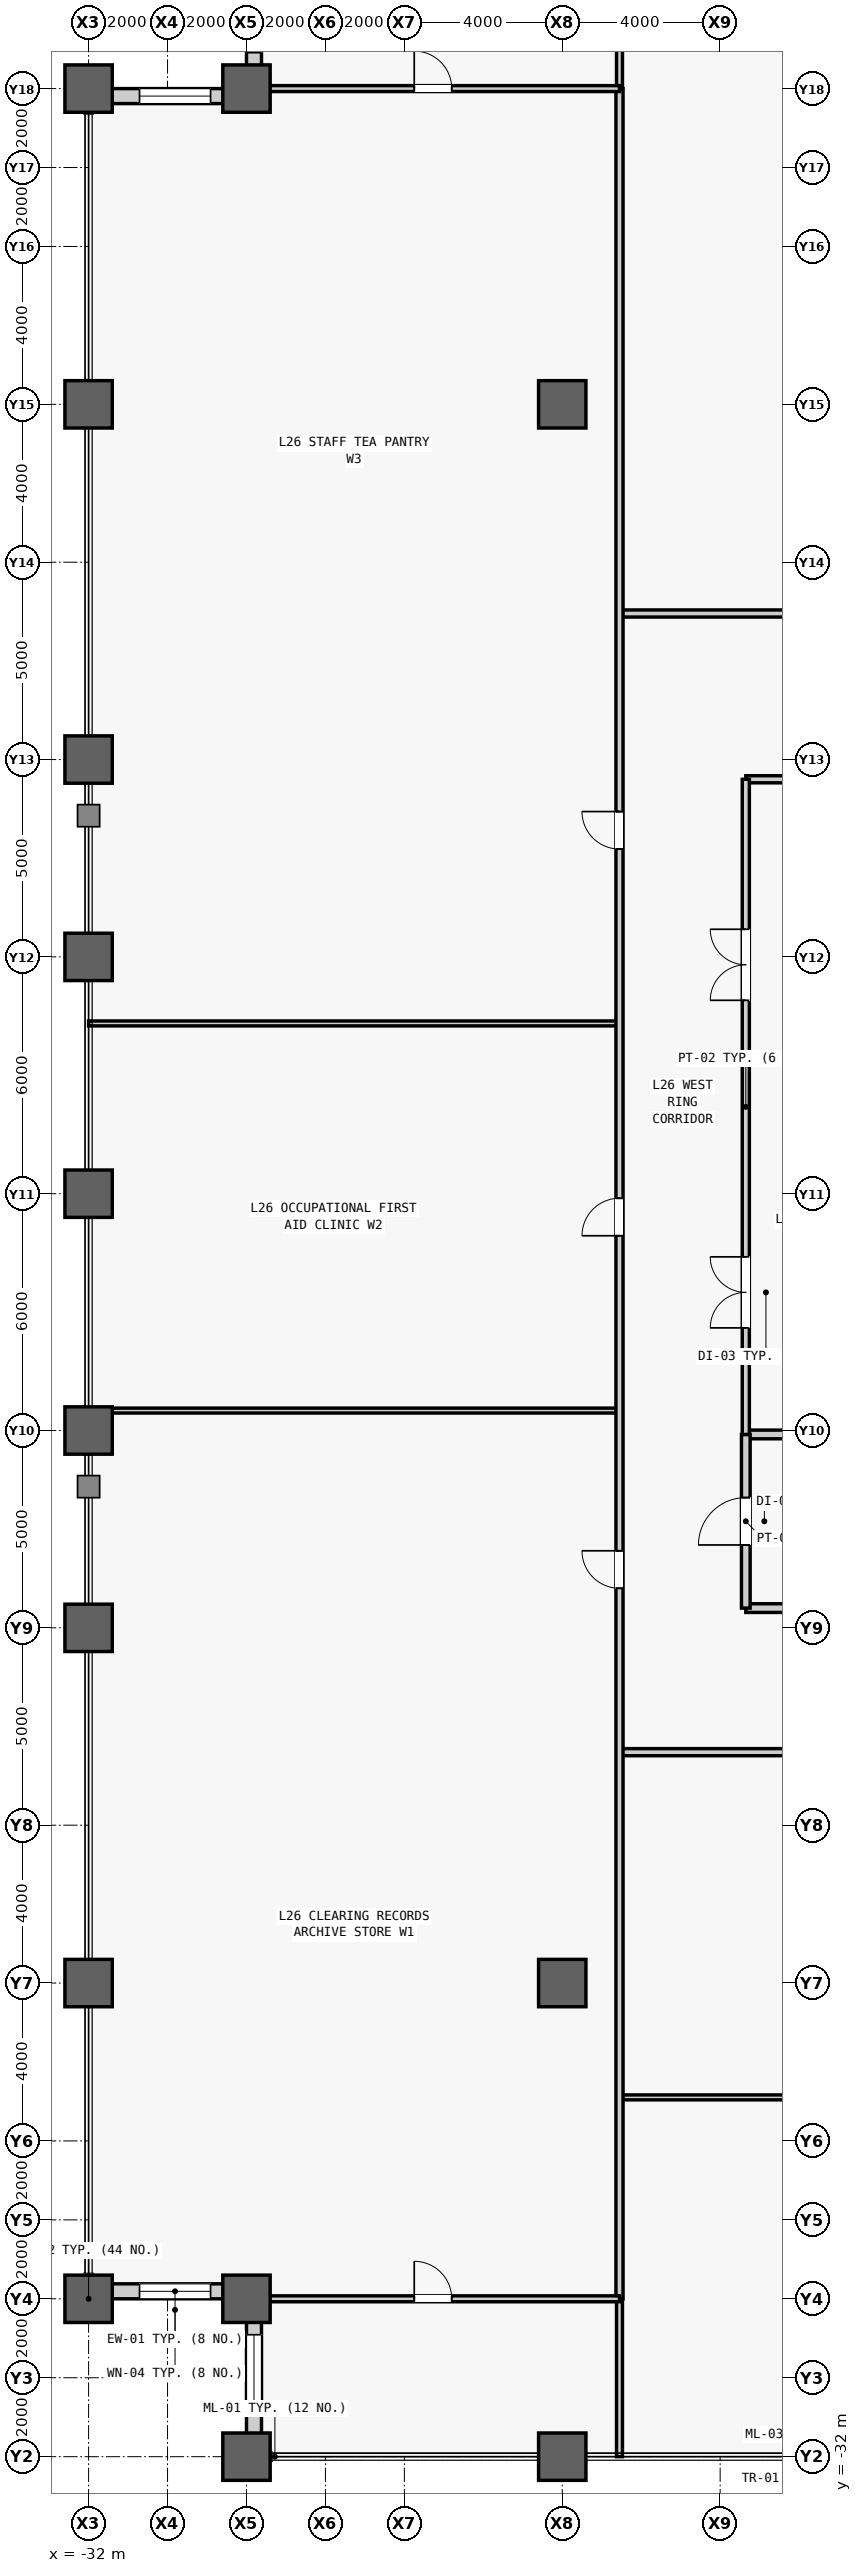
"""IFC4 building model, lengths in metres.
Left out: names, types, materials, properties, quantities, classifications, styles, units other than length and angle.
Written with IfcOpenShell. Run it as: python <this file> out.ifc"""

import sys

from ifc_helpers import new_model, si_unit, direction, frame, frame_2d, origin, origin_2d, place, context, subcontext, project, spatial, rectangle, hollow_rectangle, extrude, source, transform, mapped, element, fill, save


model = new_model("IFC4")
c1 = context("Model", 3, precision=1e-05, world=origin(), true_north=direction((0.0, 1.0)))
c2 = subcontext(c1, "Body", "Model", "MODEL_VIEW")
j1 = project(units=[si_unit("LENGTHUNIT", "METRE"), si_unit("PLANEANGLEUNIT", "RADIAN")], contexts=[c1])
p1 = place(None, origin())
s1 = spatial("IfcSite", under=j1, at=p1, CompositionType="ELEMENT")
p2 = place(p1, origin())
s2 = spatial("IfcBuilding", under=s1, at=p2, CompositionType="ELEMENT")
p3 = place(p2, frame((0.0, 0.0, 116.0)))
s3 = spatial("IfcBuildingStorey", under=s2, at=p3, CompositionType="ELEMENT", Elevation=116.0)
m1 = source(origin(), c2, "Body", "SweptSolid", [
    extrude(hollow_rectangle(XDim=1.2, YDim=1.2, WallThickness=0.07, at=origin_2d()), origin(), (0.0, 0.0, 1.0), 4.1),
])
for number, where, z_axis, x_axis in (
    (1, (-32.0, -28.0, 0.0), (0.0, 0.0, 1.0), (1.0, 0.0, 0.0)),
    (2, (-32.0, -20.0, 0.0), (0.0, 0.0, 1.0), (1.0, 0.0, 0.0)),
    (3, (-32.0, -11.0, 0.0), (0.0, 0.0, 1.0), (1.0, 0.0, 0.0)),
    (4, (-32.0, -6.0, 0.0), (0.0, 0.0, 1.0), (1.0, 0.0, 0.0)),
    (5, (-32.0, 0.0, 0.0), (0.0, 0.0, 1.0), (1.0, 0.0, 0.0)),
    (6, (-32.0, 6.0, 0.0), (0.0, 0.0, 1.0), (1.0, 0.0, 0.0)),
    (7, (-32.0, 11.0, 0.0), (0.0, 0.0, 1.0), (1.0, 0.0, 0.0)),
    (8, (-32.0, 20.0, 0.0), (0.0, 0.0, 1.0), (1.0, 0.0, 0.0)),
    (9, (-32.0, 28.0, 0.0), (0.0, 0.0, 1.0), (1.0, 0.0, 0.0)),
    (10, (-28.0, -32.0, 0.0), (0.0, 0.0, 1.0), (1.0, 0.0, 0.0)),
    (11, (-28.0, -28.0, 0.0), (0.0, 0.0, 1.0), (1.0, 0.0, 0.0)),
    (12, (-28.0, 28.0, 0.0), (0.0, 0.0, 1.0), (1.0, 0.0, 0.0)),
    (13, (-20.0, -32.0, 0.0), (0.0, 0.0, 1.0), (1.0, 0.0, 0.0)),
    (14, (-20.0, -20.0, 0.0), (0.0, 0.0, 1.0), (1.0, 0.0, 0.0)),
    (15, (-20.0, 20.0, 0.0), (0.0, 0.0, 1.0), (1.0, 0.0, 0.0)),
):
    element("IfcColumn", number, at=place(p3, frame(where, z_axis=z_axis, x_axis=x_axis)), inside=s3, PredefinedType="COLUMN", context=c2, shape_type="MappedRepresentation", body=[
        mapped(m1, transform((0.0, 0.0, 0.0), scale=1.0)),
    ])
m2 = source(origin(), c2, "Body", "SweptSolid", [
    extrude(rectangle(XDim=3.62, YDim=0.38, at=frame_2d((1.81, 0.0))), origin(), (0.0, 0.0, 1.0), 3.145),
])
p4 = place(p3, frame((-28.0, -27.81, 0.0), z_axis=(0.0, 0.0, 1.0), x_axis=(-1.0, 0.0, 0.0)))
e16 = element("IfcWall", 16, at=p4, inside=s3, PredefinedType="STANDARD", context=c2, shape_type="MappedRepresentation", body=[
    mapped(m2, transform((0.0, 0.0, 0.0), scale=1.0)),
])
m3 = source(origin(), c2, "Body", "SweptSolid", [
    extrude(rectangle(XDim=1.8, YDim=2.4, at=frame_2d((0.9, 1.2))), frame((0.0, 0.2, 0.0), z_axis=(0.0, -1.0, 0.0), x_axis=(1.0, 0.0, 0.0)), (0.0, 0.0, 1.0), 0.4),
])
p5 = place(p4, frame((0.91, 0.0, 0.5)))
e17 = element("IfcOpeningElement", 17, at=p5, cuts=e16, PredefinedType="OPENING", context=c2, shape_type="MappedRepresentation", body=[
    mapped(m3, transform((0.0, 0.0, 0.0), scale=1.0)),
])
p6 = place(p3, frame((-27.81, -31.62, 0.0), z_axis=(0.0, 0.0, 1.0), x_axis=(0.0, 1.0, 0.0)))
e18 = element("IfcWall", 18, at=p6, inside=s3, PredefinedType="STANDARD", context=c2, shape_type="MappedRepresentation", body=[
    mapped(m2, transform((0.0, 0.0, 0.0), scale=1.0)),
])
p7 = place(p6, frame((0.91, 0.0, 0.5)))
e19 = element("IfcOpeningElement", 19, at=p7, cuts=e18, PredefinedType="OPENING", context=c2, shape_type="MappedRepresentation", body=[
    mapped(m3, transform((0.0, 0.0, 0.0), scale=1.0)),
])
p8 = place(p3, frame((-27.81, 28.0, 0.0), z_axis=(0.0, 0.0, 1.0), x_axis=(0.0, 1.0, 0.0)))
e20 = element("IfcWall", 20, at=p8, inside=s3, PredefinedType="STANDARD", context=c2, shape_type="MappedRepresentation", body=[
    mapped(m2, transform((0.0, 0.0, 0.0), scale=1.0)),
])
p9 = place(p8, frame((0.91, 0.0, 0.5)))
e21 = element("IfcOpeningElement", 21, at=p9, cuts=e20, PredefinedType="OPENING", context=c2, shape_type="MappedRepresentation", body=[
    mapped(m3, transform((0.0, 0.0, 0.0), scale=1.0)),
])
p10 = place(p3, frame((-28.0, 27.81, 0.0), z_axis=(0.0, 0.0, 1.0), x_axis=(-1.0, 0.0, 0.0)))
e22 = element("IfcWall", 22, at=p10, inside=s3, PredefinedType="STANDARD", context=c2, shape_type="MappedRepresentation", body=[
    mapped(m2, transform((0.0, 0.0, 0.0), scale=1.0)),
])
p11 = place(p10, frame((0.91, 0.0, 0.5)))
e23 = element("IfcOpeningElement", 23, at=p11, cuts=e22, PredefinedType="OPENING", context=c2, shape_type="MappedRepresentation", body=[
    mapped(m3, transform((0.0, 0.0, 0.0), scale=1.0)),
])
m4 = source(origin(), c2, "Body", "SweptSolid", [
    extrude(rectangle(XDim=4.05, YDim=0.22, at=frame_2d((2.025, 0.0))), origin(), (0.0, 0.0, 1.0), 3.84),
])
p12 = place(p3, frame((-15.35, -10.5, 0.0), z_axis=(0.0, 0.0, 1.0), x_axis=(1.0, 0.0, 0.0)))
e24 = element("IfcWall", 24, at=p12, inside=s3, PredefinedType="PARTITIONING", context=c2, shape_type="MappedRepresentation", body=[
    mapped(m4, transform((0.0, 0.0, 0.0), scale=1.0)),
])
m5 = source(origin(), c2, "Body", "SweptSolid", [
    extrude(rectangle(XDim=4.05, YDim=0.22, at=frame_2d((2.025, 0.0))), origin(), (0.0, 0.0, 1.0), 3.067),
])
p13 = place(p3, frame((-15.35, -6.1, 0.0), z_axis=(0.0, 0.0, 1.0), x_axis=(1.0, 0.0, 0.0)))
e25 = element("IfcWall", 25, at=p13, inside=s3, PredefinedType="PARTITIONING", context=c2, shape_type="MappedRepresentation", body=[
    mapped(m5, transform((0.0, 0.0, 0.0), scale=1.0)),
])
m6 = source(origin(), c2, "Body", "SweptSolid", [
    extrude(rectangle(XDim=4.4, YDim=0.22, at=frame_2d((2.2, 0.0))), origin(), (0.0, 0.0, 1.0), 3.84),
])
p14 = place(p3, frame((-15.35, -10.5, 0.0), z_axis=(0.0, 0.0, 1.0), x_axis=(0.0, 1.0, 0.0)))
e26 = element("IfcWall", 26, at=p14, inside=s3, PredefinedType="PARTITIONING", context=c2, shape_type="MappedRepresentation", body=[
    mapped(m6, transform((0.0, 0.0, 0.0), scale=1.0)),
])
m7 = source(origin(), c2, "Body", "SweptSolid", [
    extrude(rectangle(XDim=1.2, YDim=2.2, at=frame_2d((0.6, 1.1))), frame((0.0, 0.12, 0.0), z_axis=(0.0, -1.0, 0.0), x_axis=(1.0, 0.0, 0.0)), (0.0, 0.0, 1.0), 0.24),
])
p15 = place(p14, frame((1.6, 0.0, 0.0)))
e27 = element("IfcOpeningElement", 27, at=p15, cuts=e26, PredefinedType="OPENING", context=c2, shape_type="MappedRepresentation", body=[
    mapped(m7, transform((0.0, 0.0, 0.0), scale=1.0)),
])
m8 = source(origin(), c2, "Body", "SweptSolid", [
    extrude(rectangle(XDim=4.05, YDim=0.18, at=frame_2d((2.025, 0.0))), origin(), (0.0, 0.0, 1.0), 3.84),
])
p16 = place(p3, frame((-15.35, 10.5, 0.0), z_axis=(0.0, 0.0, 1.0), x_axis=(1.0, 0.0, 0.0)))
e28 = element("IfcWall", 28, at=p16, inside=s3, PredefinedType="PARTITIONING", context=c2, shape_type="MappedRepresentation", body=[
    mapped(m8, transform((0.0, 0.0, 0.0), scale=1.0)),
])
m9 = source(origin(), c2, "Body", "SweptSolid", [
    extrude(rectangle(XDim=16.6, YDim=0.18, at=frame_2d((8.3, 0.0))), origin(), (0.0, 0.0, 1.0), 3.84),
])
p17 = place(p3, frame((-15.35, -6.1, 0.0), z_axis=(0.0, 0.0, 1.0), x_axis=(0.0, 1.0, 0.0)))
e29 = element("IfcWall", 29, at=p17, inside=s3, PredefinedType="PARTITIONING", context=c2, shape_type="MappedRepresentation", body=[
    mapped(m9, transform((0.0, 0.0, 0.0), scale=1.0)),
])
m10 = source(origin(), c2, "Body", "SweptSolid", [
    extrude(rectangle(XDim=1.8, YDim=2.25, at=frame_2d((0.9, 1.125))), frame((0.0, 0.1, 0.0), z_axis=(0.0, -1.0, 0.0), x_axis=(1.0, 0.0, 0.0)), (0.0, 0.0, 1.0), 0.2),
])
p18 = place(p17, frame((2.7, 0.0, 0.0)))
e30 = element("IfcOpeningElement", 30, at=p18, cuts=e29, PredefinedType="OPENING", context=c2, shape_type="MappedRepresentation", body=[
    mapped(m10, transform((0.0, 0.0, 0.0), scale=1.0)),
])
p19 = place(p17, frame((11.0, 0.0, 0.0)))
e31 = element("IfcOpeningElement", 31, at=p19, cuts=e29, PredefinedType="OPENING", context=c2, shape_type="MappedRepresentation", body=[
    mapped(m10, transform((0.0, 0.0, 0.0), scale=1.0)),
])
m11 = source(origin(), c2, "Body", "SweptSolid", [
    extrude(rectangle(XDim=37.95, YDim=0.125, at=frame_2d((18.975, 0.0))), origin(), (0.0, 0.0, 1.0), 3.84),
])
p20 = place(p3, frame((-18.55, -22.896, 0.0), z_axis=(0.0, 0.0, 1.0), x_axis=(1.0, 0.0, 0.0)))
e32 = element("IfcWall", 32, at=p20, inside=s3, PredefinedType="PARTITIONING", context=c2, shape_type="MappedRepresentation", body=[
    mapped(m11, transform((0.0, 0.0, 0.0), scale=1.0)),
])
m12 = source(origin(), c2, "Body", "SweptSolid", [
    extrude(rectangle(XDim=0.95, YDim=2.15, at=frame_2d((0.475, 1.075))), frame((0.0, 0.073, 0.0), z_axis=(0.0, -1.0, 0.0), x_axis=(1.0, 0.0, 0.0)), (0.0, 0.0, 1.0), 0.145),
])
p21 = place(p20, frame((18.5, 0.0, 0.0)))
e33 = element("IfcOpeningElement", 33, at=p21, cuts=e32, PredefinedType="OPENING", context=c2, shape_type="MappedRepresentation", body=[
    mapped(m12, transform((0.0, 0.0, 0.0), scale=1.0)),
])
m13 = source(origin(), c2, "Body", "SweptSolid", [
    extrude(rectangle(XDim=37.95, YDim=0.18, at=frame_2d((18.975, 0.0))), origin(), (0.0, 0.0, 1.0), 3.84),
])
p22 = place(p3, frame((-18.55, -14.15, 0.0), z_axis=(0.0, 0.0, 1.0), x_axis=(1.0, 0.0, 0.0)))
e34 = element("IfcWall", 34, at=p22, inside=s3, PredefinedType="PARTITIONING", context=c2, shape_type="MappedRepresentation", body=[
    mapped(m13, transform((0.0, 0.0, 0.0), scale=1.0)),
])
m14 = source(origin(), c2, "Body", "SweptSolid", [
    extrude(rectangle(XDim=1.05, YDim=2.2, at=frame_2d((0.525, 1.1))), frame((0.0, 0.1, 0.0), z_axis=(0.0, -1.0, 0.0), x_axis=(1.0, 0.0, 0.0)), (0.0, 0.0, 1.0), 0.2),
])
p23 = place(p22, frame((18.025, 0.0, 0.0)))
e35 = element("IfcOpeningElement", 35, at=p23, cuts=e34, PredefinedType="OPENING", context=c2, shape_type="MappedRepresentation", body=[
    mapped(m14, transform((0.0, 0.0, 0.0), scale=1.0)),
])
p24 = place(p3, frame((-18.55, 14.7, 0.0), z_axis=(0.0, 0.0, 1.0), x_axis=(1.0, 0.0, 0.0)))
e36 = element("IfcWall", 36, at=p24, inside=s3, PredefinedType="PARTITIONING", context=c2, shape_type="MappedRepresentation", body=[
    mapped(m13, transform((0.0, 0.0, 0.0), scale=1.0)),
])
p25 = place(p24, frame((8.001, 0.0, 0.0)))
e37 = element("IfcOpeningElement", 37, at=p25, cuts=e36, PredefinedType="OPENING", context=c2, shape_type="MappedRepresentation", body=[
    mapped(m14, transform((0.0, 0.0, 0.0), scale=1.0)),
])
p26 = place(p24, frame((18.83, 0.0, 0.0)))
e38 = element("IfcOpeningElement", 38, at=p26, cuts=e36, PredefinedType="OPENING", context=c2, shape_type="MappedRepresentation", body=[
    mapped(m14, transform((0.0, 0.0, 0.0), scale=1.0)),
])
p27 = place(p24, frame((28.853, 0.0, 0.0)))
e39 = element("IfcOpeningElement", 39, at=p27, cuts=e36, PredefinedType="OPENING", context=c2, shape_type="MappedRepresentation", body=[
    mapped(m14, transform((0.0, 0.0, 0.0), scale=1.0)),
])
m15 = source(origin(), c2, "Body", "SweptSolid", [
    extrude(rectangle(XDim=4.0, YDim=0.15, at=frame_2d((2.0, 0.0))), origin(), (0.0, 0.0, 1.0), 3.84),
])
for number, where, z_axis, x_axis in (
    (40, (-18.55, -32.0, 0.0), (0.0, 0.0, 1.0), (0.0, 1.0, 0.0)),
    (41, (-18.55, 28.0, 0.0), (0.0, 0.0, 1.0), (0.0, 1.0, 0.0)),
):
    element("IfcWall", number, at=place(p3, frame(where, z_axis=z_axis, x_axis=x_axis)), inside=s3, PredefinedType="PARTITIONING", context=c2, shape_type="MappedRepresentation", body=[
        mapped(m15, transform((0.0, 0.0, 0.0), scale=1.0)),
    ])
m16 = source(origin(), c2, "Body", "SweptSolid", [
    extrude(rectangle(XDim=13.45, YDim=0.125, at=frame_2d((6.725, 0.0))), origin(), (0.0, 0.0, 1.0), 3.84),
])
for number, where, z_axis, x_axis in (
    (42, (-32.0, -5.495, 0.0), (0.0, 0.0, 1.0), (1.0, 0.0, 0.0)),
    (43, (-32.0, 4.314, 0.0), (0.0, 0.0, 1.0), (1.0, 0.0, 0.0)),
):
    element("IfcWall", number, at=place(p3, frame(where, z_axis=z_axis, x_axis=x_axis)), inside=s3, PredefinedType="PARTITIONING", context=c2, shape_type="MappedRepresentation", body=[
        mapped(m16, transform((0.0, 0.0, 0.0), scale=1.0)),
    ])
m17 = source(origin(), c2, "Body", "SweptSolid", [
    extrude(rectangle(XDim=56.0, YDim=0.18, at=frame_2d((28.0, 0.0))), origin(), (0.0, 0.0, 1.0), 3.84),
])
p28 = place(p3, frame((-18.55, -28.0, 0.0), z_axis=(0.0, 0.0, 1.0), x_axis=(0.0, 1.0, 0.0)))
e44 = element("IfcWall", 44, at=p28, inside=s3, PredefinedType="PARTITIONING", context=c2, shape_type="MappedRepresentation", body=[
    mapped(m17, transform((0.0, 0.0, 0.0), scale=1.0)),
])
m18 = source(origin(), c2, "Body", "SweptSolid", [
    extrude(rectangle(XDim=0.95, YDim=2.15, at=frame_2d((0.475, 1.075))), frame((0.0, 0.1, 0.0), z_axis=(0.0, -1.0, 0.0), x_axis=(1.0, 0.0, 0.0)), (0.0, 0.0, 1.0), 0.2),
])
p29 = place(p28, frame((18.002, 0.0, 0.0)))
e45 = element("IfcOpeningElement", 45, at=p29, cuts=e44, PredefinedType="OPENING", context=c2, shape_type="MappedRepresentation", body=[
    mapped(m18, transform((0.0, 0.0, 0.0), scale=1.0)),
])
p30 = place(p28, frame((26.935, 0.0, 0.0)))
e46 = element("IfcOpeningElement", 46, at=p30, cuts=e44, PredefinedType="OPENING", context=c2, shape_type="MappedRepresentation", body=[
    mapped(m18, transform((0.0, 0.0, 0.0), scale=1.0)),
])
p31 = place(p28, frame((36.732, 0.0, 0.0)))
e47 = element("IfcOpeningElement", 47, at=p31, cuts=e44, PredefinedType="OPENING", context=c2, shape_type="MappedRepresentation", body=[
    mapped(m18, transform((0.0, 0.0, 0.0), scale=1.0)),
])
m19 = source(origin(), c2, "Body", "SweptSolid", [
    extrude(rectangle(XDim=9.45, YDim=0.15, at=frame_2d((4.725, 0.0))), origin(), (0.0, 0.0, 1.0), 3.84),
])
p32 = place(p3, frame((-28.0, -28.0, 0.0), z_axis=(0.0, 0.0, 1.0), x_axis=(1.0, 0.0, 0.0)))
e48 = element("IfcWall", 48, at=p32, inside=s3, PredefinedType="PARTITIONING", context=c2, shape_type="MappedRepresentation", body=[
    mapped(m19, transform((0.0, 0.0, 0.0), scale=1.0)),
])
m20 = source(origin(), c2, "Body", "SweptSolid", [
    extrude(rectangle(XDim=0.95, YDim=2.15, at=frame_2d((0.475, 1.075))), frame((0.0, 0.085, 0.0), z_axis=(0.0, -1.0, 0.0), x_axis=(1.0, 0.0, 0.0)), (0.0, 0.0, 1.0), 0.17),
])
p33 = place(p32, frame((4.25, 0.0, 0.0)))
e49 = element("IfcOpeningElement", 49, at=p33, cuts=e48, PredefinedType="OPENING", context=c2, shape_type="MappedRepresentation", body=[
    mapped(m20, transform((0.0, 0.0, 0.0), scale=1.0)),
])
p34 = place(p3, frame((-28.0, 28.0, 0.0), z_axis=(0.0, 0.0, 1.0), x_axis=(1.0, 0.0, 0.0)))
e50 = element("IfcWall", 50, at=p34, inside=s3, PredefinedType="PARTITIONING", context=c2, shape_type="MappedRepresentation", body=[
    mapped(m19, transform((0.0, 0.0, 0.0), scale=1.0)),
])
p35 = place(p34, frame((4.25, 0.0, 0.0)))
e51 = element("IfcOpeningElement", 51, at=p35, cuts=e50, PredefinedType="OPENING", context=c2, shape_type="MappedRepresentation", body=[
    mapped(m20, transform((0.0, 0.0, 0.0), scale=1.0)),
])
m21 = source(origin(), c2, "Body", "SweptSolid", [
    extrude(rectangle(XDim=1.8, YDim=2.4, at=frame_2d((0.9, 1.2))), frame((0.0, 0.03, 0.0), z_axis=(0.0, -1.0, 0.0), x_axis=(1.0, 0.0, 0.0)), (0.0, 0.0, 1.0), 0.06),
])
p36 = place(p5, origin())
e52 = element("IfcWindow", 52, at=p36, inside=s3, PartitioningType="SINGLE_PANEL", PredefinedType="WINDOW", context=c2, shape_type="MappedRepresentation", body=[
    mapped(m21, transform((0.0, 0.0, 0.0), scale=1.0)),
])
fill(e17, e52)
p37 = place(p7, origin())
e53 = element("IfcWindow", 53, at=p37, inside=s3, PartitioningType="SINGLE_PANEL", PredefinedType="WINDOW", context=c2, shape_type="MappedRepresentation", body=[
    mapped(m21, transform((0.0, 0.0, 0.0), scale=1.0)),
])
fill(e19, e53)
p38 = place(p9, origin())
e54 = element("IfcWindow", 54, at=p38, inside=s3, PartitioningType="SINGLE_PANEL", PredefinedType="WINDOW", context=c2, shape_type="MappedRepresentation", body=[
    mapped(m21, transform((0.0, 0.0, 0.0), scale=1.0)),
])
fill(e21, e54)
p39 = place(p11, origin())
e55 = element("IfcWindow", 55, at=p39, inside=s3, PartitioningType="SINGLE_PANEL", PredefinedType="WINDOW", context=c2, shape_type="MappedRepresentation", body=[
    mapped(m21, transform((0.0, 0.0, 0.0), scale=1.0)),
])
fill(e23, e55)
m22 = source(origin(), c2, "Body", "SweptSolid", [
    extrude(rectangle(XDim=1.2, YDim=2.2, at=frame_2d((0.6, 1.1))), frame((0.0, 0.025, 0.0), z_axis=(0.0, -1.0, 0.0), x_axis=(1.0, 0.0, 0.0)), (0.0, 0.0, 1.0), 0.05),
])
p40 = place(p15, origin())
e56 = element("IfcDoor", 56, at=p40, inside=s3, OperationType="SINGLE_SWING_LEFT", PredefinedType="DOOR", context=c2, shape_type="MappedRepresentation", body=[
    mapped(m22, transform((0.0, 0.0, 0.0), scale=1.0)),
])
fill(e27, e56)
m23 = source(origin(), c2, "Body", "SweptSolid", [
    extrude(rectangle(XDim=1.8, YDim=2.25, at=frame_2d((0.9, 1.125))), frame((0.0, 0.025, 0.0), z_axis=(0.0, -1.0, 0.0), x_axis=(1.0, 0.0, 0.0)), (0.0, 0.0, 1.0), 0.05),
])
p41 = place(p18, origin())
e57 = element("IfcDoor", 57, at=p41, inside=s3, OperationType="SINGLE_SWING_LEFT", PredefinedType="DOOR", context=c2, shape_type="MappedRepresentation", body=[
    mapped(m23, transform((0.0, 0.0, 0.0), scale=1.0)),
])
fill(e30, e57)
p42 = place(p19, origin())
e58 = element("IfcDoor", 58, at=p42, inside=s3, OperationType="SINGLE_SWING_RIGHT", PredefinedType="DOOR", context=c2, shape_type="MappedRepresentation", body=[
    mapped(m23, transform((0.0, 0.0, 0.0), scale=1.0)),
])
fill(e31, e58)
m24 = source(origin(), c2, "Body", "SweptSolid", [
    extrude(rectangle(XDim=0.95, YDim=2.15, at=frame_2d((0.475, 1.075))), frame((0.0, 0.025, 0.0), z_axis=(0.0, -1.0, 0.0), x_axis=(1.0, 0.0, 0.0)), (0.0, 0.0, 1.0), 0.05),
])
p43 = place(p29, origin())
e59 = element("IfcDoor", 59, at=p43, inside=s3, OperationType="SINGLE_SWING_RIGHT", PredefinedType="DOOR", context=c2, shape_type="MappedRepresentation", body=[
    mapped(m24, transform((0.0, 0.0, 0.0), scale=1.0)),
])
fill(e45, e59)
p44 = place(p30, origin())
e60 = element("IfcDoor", 60, at=p44, inside=s3, OperationType="SINGLE_SWING_LEFT", PredefinedType="DOOR", context=c2, shape_type="MappedRepresentation", body=[
    mapped(m24, transform((0.0, 0.0, 0.0), scale=1.0)),
])
fill(e46, e60)
p45 = place(p31, origin())
e61 = element("IfcDoor", 61, at=p45, inside=s3, OperationType="SINGLE_SWING_RIGHT", PredefinedType="DOOR", context=c2, shape_type="MappedRepresentation", body=[
    mapped(m24, transform((0.0, 0.0, 0.0), scale=1.0)),
])
fill(e47, e61)
p46 = place(p33, origin())
e62 = element("IfcDoor", 62, at=p46, inside=s3, OperationType="SINGLE_SWING_LEFT", PredefinedType="DOOR", context=c2, shape_type="MappedRepresentation", body=[
    mapped(m24, transform((0.0, 0.0, 0.0), scale=1.0)),
])
fill(e49, e62)
p47 = place(p35, origin())
e63 = element("IfcDoor", 63, at=p47, inside=s3, OperationType="SINGLE_SWING_LEFT", PredefinedType="DOOR", context=c2, shape_type="MappedRepresentation", body=[
    mapped(m24, transform((0.0, 0.0, 0.0), scale=1.0)),
])
fill(e51, e63)
save(model, sys.argv[1])
